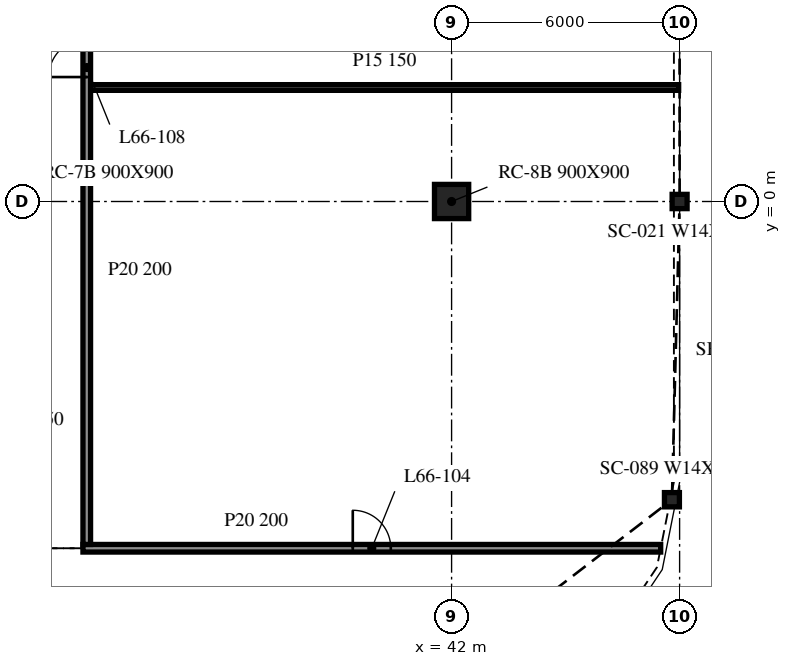
"""IFC4 building model, lengths in metres.
Left out: names, types, materials, properties, quantities, classifications, styles, units other than length and angle.
Written with IfcOpenShell. Run it as: python <this file> out.ifc"""

import sys

from ifc_helpers import new_model, si_unit, direction, frame, frame_2d, origin, origin_2d, place, context, subcontext, project, spatial, rectangle, i_section, extrude, element, fill, save


model = new_model("IFC4")
c1 = context("Model", 3, precision=1e-05, world=origin(), true_north=direction((0.0, 1.0)))
c2 = subcontext(c1, "Body", "Model", "MODEL_VIEW")
j1 = project(units=[si_unit("LENGTHUNIT", "METRE"), si_unit("PLANEANGLEUNIT", "RADIAN")], contexts=[c1])
p1 = place(None, origin())
s1 = spatial("IfcSite", under=j1, at=p1, CompositionType="ELEMENT")
p2 = place(p1, origin())
s2 = spatial("IfcBuilding", under=s1, at=p2, CompositionType="ELEMENT")
p3 = place(p2, frame((0.0, 0.0, 270.9)))
s3 = spatial("IfcBuildingStorey", under=s2, at=p3, CompositionType="ELEMENT", Elevation=270.9)
p4 = place(p3, frame((42.0, 0.0, -0.34), z_axis=(0.0, 0.0, 1.0), x_axis=(1.0, 0.0, 0.0)))
e1 = element("IfcColumn", 1, at=p4, inside=s3, PredefinedType="COLUMN", context=c2, shape_type="SweptSolid", body=[
    extrude(rectangle(XDim=0.9, YDim=0.9, at=origin_2d()), origin(), (0.0, 0.0, 1.0), 3.8),
])
for number, where, z_axis, x_axis in (
    (2, (47.798, -7.848, -0.34), (0.0, 0.0, 1.0), (1.0, 0.0, 0.0)),
    (3, (48.0, 0.0, -0.34), (0.0, 0.0, 1.0), (1.0, 0.0, 0.0)),
):
    element("IfcColumn", number, at=place(p3, frame(where, z_axis=z_axis, x_axis=x_axis)), inside=s3, PredefinedType="COLUMN", context=c2, shape_type="SweptSolid", body=[
        extrude(i_section(OverallWidth=0.394, OverallDepth=0.376, WebThickness=0.017, FlangeThickness=0.028, at=origin_2d()), origin(), (0.0, 0.0, 1.0), 3.8),
    ])
p5 = place(p3, frame((32.3, -9.125, 0.0), z_axis=(0.0, 0.0, 1.0), x_axis=(1.0, 0.0, 0.0)))
e4 = element("IfcWall", 4, at=p5, inside=s3, PredefinedType="PARTITIONING", context=c2, shape_type="SweptSolid", body=[
    extrude(rectangle(XDim=15.202, YDim=0.2, at=frame_2d((7.601, 0.0))), origin(), (0.0, 0.0, 1.0), 3.46),
])
p6 = place(p5, frame((7.1, 0.0, 0.0)))
e5 = element("IfcOpeningElement", 5, at=p6, cuts=e4, PredefinedType="OPENING", context=c2, shape_type="SweptSolid", body=[
    extrude(rectangle(XDim=1.0, YDim=2.1, at=frame_2d((0.5, 1.05))), frame((0.0, 0.11, 0.0), z_axis=(0.0, -1.0, 0.0), x_axis=(1.0, 0.0, 0.0)), (0.0, 0.0, 1.0), 0.22),
])
p7 = place(p3, frame((32.5, 3.0, 0.0), z_axis=(0.0, 0.0, 1.0), x_axis=(1.0, 0.0, 0.0)))
e6 = element("IfcWall", 6, at=p7, inside=s3, PredefinedType="PARTITIONING", context=c2, shape_type="SweptSolid", body=[
    extrude(rectangle(XDim=15.475, YDim=0.15, at=frame_2d((7.738, 0.0))), origin(), (0.0, 0.0, 1.0), 3.46),
])
p8 = place(p3, frame((32.4, -9.025, 0.0), z_axis=(0.0, 0.0, 1.0), x_axis=(0.0, 1.0, 0.0)))
e7 = element("IfcWall", 7, at=p8, inside=s3, PredefinedType="PARTITIONING", context=c2, shape_type="SweptSolid", body=[
    extrude(rectangle(XDim=24.05, YDim=0.2, at=frame_2d((12.025, 0.0))), origin(), (0.0, 0.0, 1.0), 3.46),
])
p9 = place(p8, frame((12.3, 0.0, 0.0)))
e8 = element("IfcOpeningElement", 8, at=p9, cuts=e7, PredefinedType="OPENING", context=c2, shape_type="SweptSolid", body=[
    extrude(rectangle(XDim=1.0, YDim=2.1, at=frame_2d((0.5, 1.05))), frame((0.0, 0.11, 0.0), z_axis=(0.0, -1.0, 0.0), x_axis=(1.0, 0.0, 0.0)), (0.0, 0.0, 1.0), 0.22),
])
p10 = place(p6, origin())
e9 = element("IfcDoor", 9, at=p10, inside=s3, OperationType="SINGLE_SWING_LEFT", PredefinedType="DOOR", context=c2, shape_type="SweptSolid", body=[
    extrude(rectangle(XDim=1.0, YDim=2.1, at=frame_2d((0.5, 1.05))), frame((0.0, 0.025, 0.0), z_axis=(0.0, -1.0, 0.0), x_axis=(1.0, 0.0, 0.0)), (0.0, 0.0, 1.0), 0.05),
])
fill(e5, e9)
p11 = place(p9, origin())
e10 = element("IfcDoor", 10, at=p11, inside=s3, OperationType="SINGLE_SWING_LEFT", PredefinedType="DOOR", context=c2, shape_type="SweptSolid", body=[
    extrude(rectangle(XDim=1.0, YDim=2.1, at=frame_2d((0.5, 1.05))), frame((0.0, 0.025, 0.0), z_axis=(0.0, -1.0, 0.0), x_axis=(1.0, 0.0, 0.0)), (0.0, 0.0, 1.0), 0.05),
])
fill(e8, e10)
save(model, sys.argv[1])
